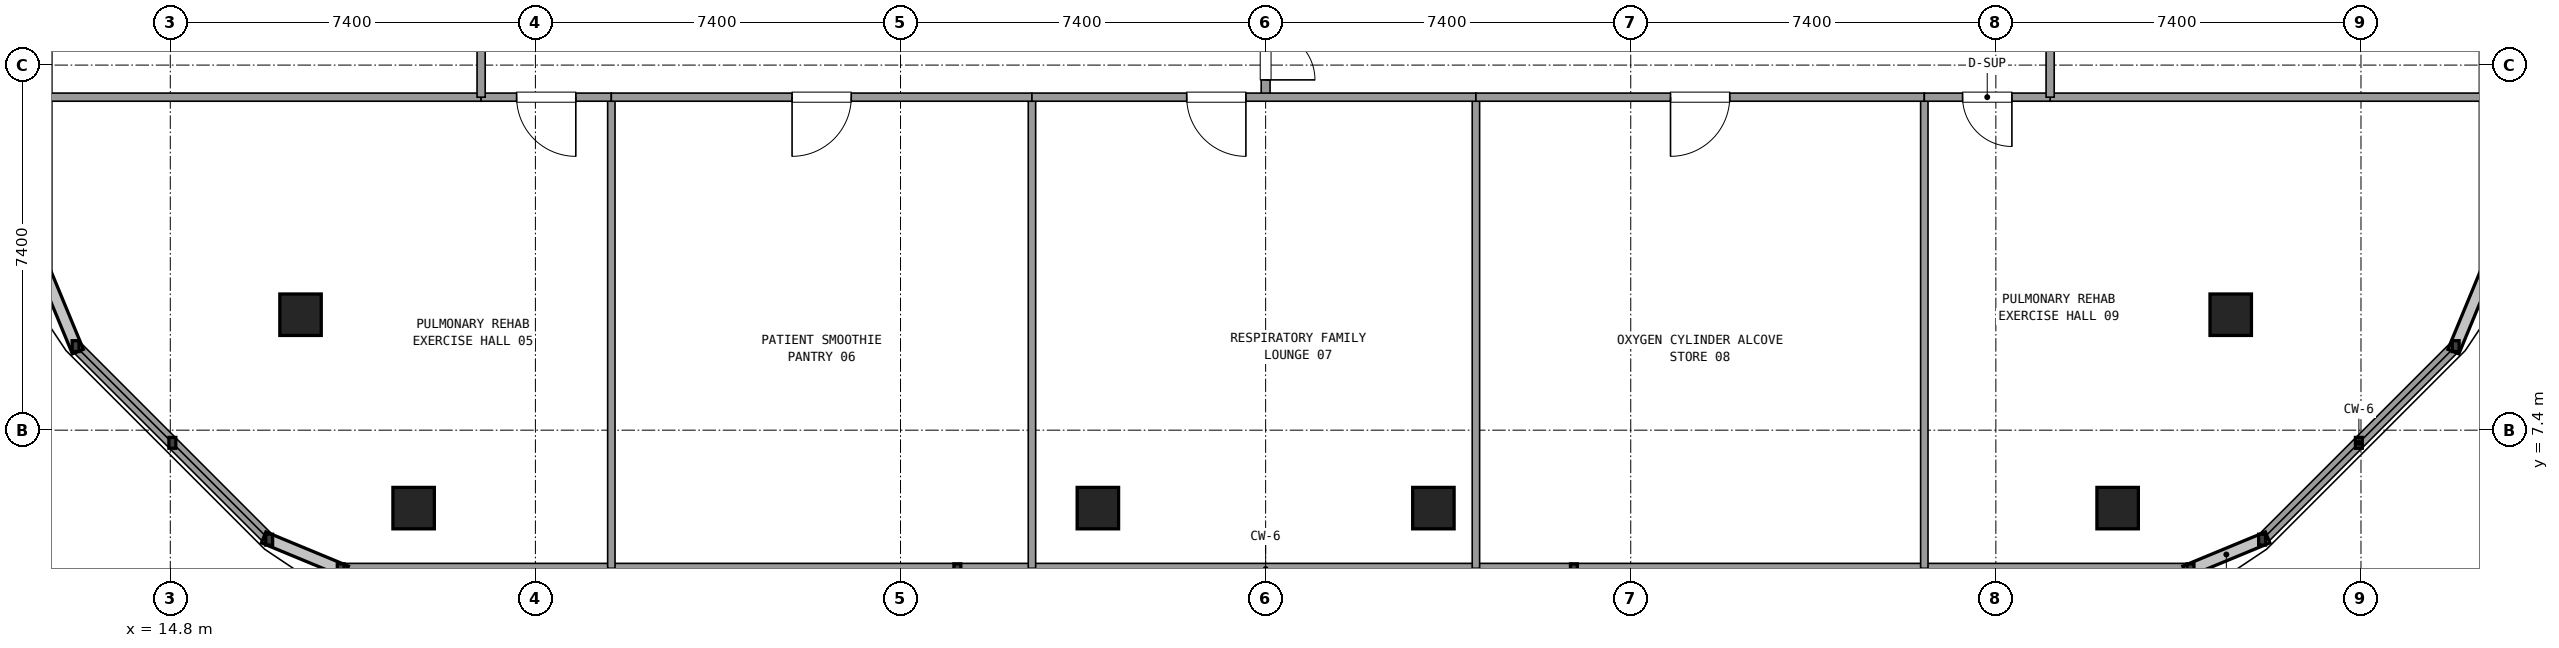
"""IFC4 building model, lengths in metres.
Left out: names, types, materials, properties, quantities, classifications, styles, units other than length and angle.
Written with IfcOpenShell. Run it as: python <this file> out.ifc"""

import sys

from ifc_helpers import new_model, si_unit, direction, frame, frame_2d, origin, origin_2d, place, context, subcontext, project, spatial, rectangle, extrude, element, fill, save


model = new_model("IFC4")
c1 = context("Model", 3, precision=1e-05, world=origin(), true_north=direction((0.0, 1.0)))
c2 = subcontext(c1, "Body", "Model", "MODEL_VIEW")
j1 = project(units=[si_unit("LENGTHUNIT", "METRE"), si_unit("PLANEANGLEUNIT", "RADIAN")], contexts=[c1])
p1 = place(None, origin())
s1 = spatial("IfcSite", under=j1, at=p1, CompositionType="ELEMENT")
p2 = place(p1, origin())
s2 = spatial("IfcBuilding", under=s1, at=p2, CompositionType="ELEMENT")
p3 = place(p2, frame((0.0, 0.0, 271.62)))
s3 = spatial("IfcBuildingStorey", under=s2, at=p3, CompositionType="ELEMENT", Elevation=271.62)
for number, where, z_axis, x_axis in (
    (1, (17.44, 9.74, 0.0), (0.0, 0.0, 1.0), (1.0, 0.0, 0.0)),
    (2, (19.732, 5.82, 0.0), (0.0, 0.0, 1.0), (1.0, 0.0, 0.0)),
    (3, (33.6, 5.82, 0.0), (0.0, 0.0, 1.0), (1.0, 0.0, 0.0)),
    (4, (40.4, 5.82, 0.0), (0.0, 0.0, 1.0), (1.0, 0.0, 0.0)),
    (5, (54.268, 5.82, 0.0), (0.0, 0.0, 1.0), (1.0, 0.0, 0.0)),
    (6, (56.56, 9.74, 0.0), (0.0, 0.0, 1.0), (1.0, 0.0, 0.0)),
):
    element("IfcColumn", number, at=place(p3, frame(where, z_axis=z_axis, x_axis=x_axis)), inside=s3, PredefinedType="COLUMN", context=c2, shape_type="SweptSolid", body=[
        extrude(rectangle(XDim=0.84, YDim=0.84, at=origin_2d()), origin(), (0.0, 0.0, 1.0), 3.6),
    ])
p4 = place(p3, frame((18.255, 4.58, 0.0), z_axis=(0.0, 0.0, 1.0), x_axis=(1.0, 0.0, 0.0)))
e7 = element("IfcWall", 7, at=p4, inside=s3, PredefinedType="SOLIDWALL", context=c2, shape_type="SweptSolid", body=[
    extrude(rectangle(XDim=37.49, YDim=0.24, at=frame_2d((18.745, 0.0))), origin(), (0.0, 0.0, 1.0), 0.85),
])
p5 = place(p3, frame((57.196, 5.181, 0.0), z_axis=(0.0, 0.0, 1.0), x_axis=(0.707084777957, 0.707128783731, 0.0)))
e8 = element("IfcWall", 8, at=p5, inside=s3, PredefinedType="SOLIDWALL", context=c2, shape_type="SweptSolid", body=[
    extrude(rectangle(XDim=5.548, YDim=0.24, at=frame_2d((2.774, 0.0))), origin(), (0.0, 0.0, 1.0), 0.85),
])
for number, where, z_axis, x_axis in (
    (9, (61.72, 10.555, 0.0), (0.0, 0.0, 1.0), (0.0, 1.0, 0.0)),
    (10, (12.28, 24.36, 0.0), (0.0, 0.0, 1.0), (0.0, -1.0, 0.0)),
):
    element("IfcWall", number, at=place(p3, frame(where, z_axis=z_axis, x_axis=x_axis)), inside=s3, PredefinedType="SOLIDWALL", context=c2, shape_type="SweptSolid", body=[
        extrude(rectangle(XDim=13.805, YDim=0.24, at=frame_2d((6.903, 0.0))), origin(), (0.0, 0.0, 1.0), 0.85),
    ])
p6 = place(p3, frame((12.881, 9.104, 0.0), z_axis=(0.0, 0.0, 1.0), x_axis=(0.707084777957, -0.707128783731, 0.0)))
e11 = element("IfcWall", 11, at=p6, inside=s3, PredefinedType="SOLIDWALL", context=c2, shape_type="SweptSolid", body=[
    extrude(rectangle(XDim=5.548, YDim=0.24, at=frame_2d((2.774, 0.0))), origin(), (0.0, 0.0, 1.0), 0.85),
])
p7 = place(p3, frame((37.0, 14.15, 0.0), z_axis=(0.0, 0.0, 1.0), x_axis=(0.0, 1.0, 0.0)))
e12 = element("IfcWall", 12, at=p7, inside=s3, PredefinedType="PARTITIONING", context=c2, shape_type="SweptSolid", body=[
    extrude(rectangle(XDim=2.7, YDim=0.18, at=frame_2d((1.35, 0.0))), origin(), (0.0, 0.0, 1.0), 2.61),
])
p8 = place(p7, frame((0.35, 0.0, 0.0)))
e13 = element("IfcOpeningElement", 13, at=p8, cuts=e12, PredefinedType="OPENING", context=c2, shape_type="SweptSolid", body=[
    extrude(rectangle(XDim=2.0, YDim=2.2, at=frame_2d((1.0, 1.1))), frame((0.0, 0.1, 0.0), z_axis=(0.0, -1.0, 0.0), x_axis=(1.0, 0.0, 0.0)), (0.0, 0.0, 1.0), 0.2),
])
for number, where, z_axis, x_axis in (
    (14, (12.3, 14.15, 0.0), (0.0, 0.0, 1.0), (1.0, 0.0, 0.0)),
    (15, (52.9, 14.15, 0.0), (0.0, 0.0, 1.0), (1.0, 0.0, 0.0)),
):
    element("IfcWall", number, at=place(p3, frame(where, z_axis=z_axis, x_axis=x_axis)), inside=s3, PredefinedType="PARTITIONING", context=c2, shape_type="SweptSolid", body=[
        extrude(rectangle(XDim=8.8, YDim=0.165, at=frame_2d((4.4, 0.0))), origin(), (0.0, 0.0, 1.0), 2.61),
    ])
p9 = place(p3, frame((23.739, 14.15, 0.0), z_axis=(0.0, 0.0, 1.0), x_axis=(0.0, -1.0, 0.0)))
e16 = element("IfcWall", 16, at=p9, inside=s3, PredefinedType="PARTITIONING", context=c2, shape_type="SweptSolid", body=[
    extrude(rectangle(XDim=9.55, YDim=0.15, at=frame_2d((4.775, 0.0))), origin(), (0.0, 0.0, 1.0), 2.61),
])
p10 = place(p3, frame((21.1, 14.15, 0.0), z_axis=(0.0, 0.0, 1.0), x_axis=(1.0, 0.0, 0.0)))
e17 = element("IfcWall", 17, at=p10, inside=s3, PredefinedType="PARTITIONING", context=c2, shape_type="SweptSolid", body=[
    extrude(rectangle(XDim=2.639, YDim=0.165, at=frame_2d((1.319, 0.0))), origin(), (0.0, 0.0, 1.0), 2.61),
])
p11 = place(p10, frame((0.719, 0.0, 0.0)))
e18 = element("IfcOpeningElement", 18, at=p11, cuts=e17, PredefinedType="OPENING", context=c2, shape_type="SweptSolid", body=[
    extrude(rectangle(XDim=1.2, YDim=2.15, at=frame_2d((0.6, 1.075))), frame((0.0, 0.093, 0.0), z_axis=(0.0, -1.0, 0.0), x_axis=(1.0, 0.0, 0.0)), (0.0, 0.0, 1.0), 0.185),
])
p12 = place(p3, frame((32.264, 14.15, 0.0), z_axis=(0.0, 0.0, 1.0), x_axis=(0.0, -1.0, 0.0)))
e19 = element("IfcWall", 19, at=p12, inside=s3, PredefinedType="PARTITIONING", context=c2, shape_type="SweptSolid", body=[
    extrude(rectangle(XDim=9.55, YDim=0.15, at=frame_2d((4.775, 0.0))), origin(), (0.0, 0.0, 1.0), 2.61),
])
p13 = place(p3, frame((23.739, 14.15, 0.0), z_axis=(0.0, 0.0, 1.0), x_axis=(1.0, 0.0, 0.0)))
e20 = element("IfcWall", 20, at=p13, inside=s3, PredefinedType="PARTITIONING", context=c2, shape_type="SweptSolid", body=[
    extrude(rectangle(XDim=8.525, YDim=0.165, at=frame_2d((4.262, 0.0))), origin(), (0.0, 0.0, 1.0), 2.61),
])
p14 = place(p13, frame((3.663, 0.0, 0.0)))
e21 = element("IfcOpeningElement", 21, at=p14, cuts=e20, PredefinedType="OPENING", context=c2, shape_type="SweptSolid", body=[
    extrude(rectangle(XDim=1.2, YDim=2.15, at=frame_2d((0.6, 1.075))), frame((0.0, 0.093, 0.0), z_axis=(0.0, -1.0, 0.0), x_axis=(1.0, 0.0, 0.0)), (0.0, 0.0, 1.0), 0.185),
])
p15 = place(p3, frame((41.262, 14.15, 0.0), z_axis=(0.0, 0.0, 1.0), x_axis=(0.0, -1.0, 0.0)))
e22 = element("IfcWall", 22, at=p15, inside=s3, PredefinedType="PARTITIONING", context=c2, shape_type="SweptSolid", body=[
    extrude(rectangle(XDim=9.55, YDim=0.15, at=frame_2d((4.775, 0.0))), origin(), (0.0, 0.0, 1.0), 2.61),
])
p16 = place(p3, frame((32.264, 14.15, 0.0), z_axis=(0.0, 0.0, 1.0), x_axis=(1.0, 0.0, 0.0)))
e23 = element("IfcWall", 23, at=p16, inside=s3, PredefinedType="PARTITIONING", context=c2, shape_type="SweptSolid", body=[
    extrude(rectangle(XDim=8.998, YDim=0.165, at=frame_2d((4.499, 0.0))), origin(), (0.0, 0.0, 1.0), 2.61),
])
p17 = place(p16, frame((3.136, 0.0, 0.0)))
e24 = element("IfcOpeningElement", 24, at=p17, cuts=e23, PredefinedType="OPENING", context=c2, shape_type="SweptSolid", body=[
    extrude(rectangle(XDim=1.2, YDim=2.15, at=frame_2d((0.6, 1.075))), frame((0.0, 0.093, 0.0), z_axis=(0.0, -1.0, 0.0), x_axis=(1.0, 0.0, 0.0)), (0.0, 0.0, 1.0), 0.185),
])
p18 = place(p3, frame((50.35, 14.15, 0.0), z_axis=(0.0, 0.0, 1.0), x_axis=(0.0, -1.0, 0.0)))
e25 = element("IfcWall", 25, at=p18, inside=s3, PredefinedType="PARTITIONING", context=c2, shape_type="SweptSolid", body=[
    extrude(rectangle(XDim=9.55, YDim=0.15, at=frame_2d((4.775, 0.0))), origin(), (0.0, 0.0, 1.0), 2.61),
])
p19 = place(p3, frame((41.262, 14.15, 0.0), z_axis=(0.0, 0.0, 1.0), x_axis=(1.0, 0.0, 0.0)))
e26 = element("IfcWall", 26, at=p19, inside=s3, PredefinedType="PARTITIONING", context=c2, shape_type="SweptSolid", body=[
    extrude(rectangle(XDim=9.088, YDim=0.165, at=frame_2d((4.544, 0.0))), origin(), (0.0, 0.0, 1.0), 2.61),
])
p20 = place(p19, frame((3.944, 0.0, 0.0)))
e27 = element("IfcOpeningElement", 27, at=p20, cuts=e26, PredefinedType="OPENING", context=c2, shape_type="SweptSolid", body=[
    extrude(rectangle(XDim=1.2, YDim=2.15, at=frame_2d((0.6, 1.075))), frame((0.0, 0.093, 0.0), z_axis=(0.0, -1.0, 0.0), x_axis=(1.0, 0.0, 0.0)), (0.0, 0.0, 1.0), 0.185),
])
p21 = place(p3, frame((50.35, 14.15, 0.0), z_axis=(0.0, 0.0, 1.0), x_axis=(1.0, 0.0, 0.0)))
e28 = element("IfcWall", 28, at=p21, inside=s3, PredefinedType="PARTITIONING", context=c2, shape_type="SweptSolid", body=[
    extrude(rectangle(XDim=2.55, YDim=0.165, at=frame_2d((1.275, 0.0))), origin(), (0.0, 0.0, 1.0), 2.61),
])
p22 = place(p21, frame((0.775, 0.0, 0.0)))
e29 = element("IfcOpeningElement", 29, at=p22, cuts=e28, PredefinedType="OPENING", context=c2, shape_type="SweptSolid", body=[
    extrude(rectangle(XDim=1.0, YDim=2.15, at=frame_2d((0.5, 1.075))), frame((0.0, 0.093, 0.0), z_axis=(0.0, -1.0, 0.0), x_axis=(1.0, 0.0, 0.0)), (0.0, 0.0, 1.0), 0.185),
])
p23 = place(p3, frame((21.1, 14.15, 0.0), z_axis=(0.0, 0.0, 1.0), x_axis=(0.0, 1.0, 0.0)))
e30 = element("IfcWall", 30, at=p23, inside=s3, PredefinedType="PARTITIONING", context=c2, shape_type="SweptSolid", body=[
    extrude(rectangle(XDim=8.93, YDim=0.165, at=frame_2d((4.465, 0.0))), origin(), (0.0, 0.0, 1.0), 2.61),
])
p24 = place(p23, frame((3.865, 0.0, 0.0)))
e31 = element("IfcOpeningElement", 31, at=p24, cuts=e30, PredefinedType="OPENING", context=c2, shape_type="SweptSolid", body=[
    extrude(rectangle(XDim=1.2, YDim=2.15, at=frame_2d((0.6, 1.075))), frame((0.0, 0.093, 0.0), z_axis=(0.0, -1.0, 0.0), x_axis=(1.0, 0.0, 0.0)), (0.0, 0.0, 1.0), 0.185),
])
p25 = place(p3, frame((52.9, 14.15, 0.0), z_axis=(0.0, 0.0, 1.0), x_axis=(0.0, 1.0, 0.0)))
e32 = element("IfcWall", 32, at=p25, inside=s3, PredefinedType="PARTITIONING", context=c2, shape_type="SweptSolid", body=[
    extrude(rectangle(XDim=9.95, YDim=0.165, at=frame_2d((4.975, 0.0))), origin(), (0.0, 0.0, 1.0), 2.61),
])
p26 = place(p25, frame((4.375, 0.0, 0.0)))
e33 = element("IfcOpeningElement", 33, at=p26, cuts=e32, PredefinedType="OPENING", context=c2, shape_type="SweptSolid", body=[
    extrude(rectangle(XDim=1.2, YDim=2.15, at=frame_2d((0.6, 1.075))), frame((0.0, 0.093, 0.0), z_axis=(0.0, -1.0, 0.0), x_axis=(1.0, 0.0, 0.0)), (0.0, 0.0, 1.0), 0.185),
])
p27 = place(p8, frame((2.0, 0.0, 0.0), z_axis=(0.0, 0.0, 1.0), x_axis=(-1.0, 0.0, 0.0)))
e34 = element("IfcDoor", 34, at=p27, inside=s3, OperationType="DOUBLE_DOOR_SINGLE_SWING", PredefinedType="DOOR", context=c2, shape_type="SweptSolid", body=[
    extrude(rectangle(XDim=2.0, YDim=2.2, at=frame_2d((1.0, 1.1))), frame((0.0, 0.025, 0.0), z_axis=(0.0, -1.0, 0.0), x_axis=(1.0, 0.0, 0.0)), (0.0, 0.0, 1.0), 0.05),
])
fill(e13, e34)
p28 = place(p11, frame((1.2, 0.0, 0.0), z_axis=(0.0, 0.0, 1.0), x_axis=(-1.0, 0.0, 0.0)))
e35 = element("IfcDoor", 35, at=p28, inside=s3, OperationType="SINGLE_SWING_RIGHT", PredefinedType="DOOR", context=c2, shape_type="SweptSolid", body=[
    extrude(rectangle(XDim=1.2, YDim=2.15, at=frame_2d((0.6, 1.075))), frame((0.0, 0.025, 0.0), z_axis=(0.0, -1.0, 0.0), x_axis=(1.0, 0.0, 0.0)), (0.0, 0.0, 1.0), 0.05),
])
fill(e18, e35)
p29 = place(p14, frame((1.2, 0.0, 0.0), z_axis=(0.0, 0.0, 1.0), x_axis=(-1.0, 0.0, 0.0)))
e36 = element("IfcDoor", 36, at=p29, inside=s3, OperationType="SINGLE_SWING_LEFT", PredefinedType="DOOR", context=c2, shape_type="SweptSolid", body=[
    extrude(rectangle(XDim=1.2, YDim=2.15, at=frame_2d((0.6, 1.075))), frame((0.0, 0.025, 0.0), z_axis=(0.0, -1.0, 0.0), x_axis=(1.0, 0.0, 0.0)), (0.0, 0.0, 1.0), 0.05),
])
fill(e21, e36)
p30 = place(p17, frame((1.2, 0.0, 0.0), z_axis=(0.0, 0.0, 1.0), x_axis=(-1.0, 0.0, 0.0)))
e37 = element("IfcDoor", 37, at=p30, inside=s3, OperationType="SINGLE_SWING_RIGHT", PredefinedType="DOOR", context=c2, shape_type="SweptSolid", body=[
    extrude(rectangle(XDim=1.2, YDim=2.15, at=frame_2d((0.6, 1.075))), frame((0.0, 0.025, 0.0), z_axis=(0.0, -1.0, 0.0), x_axis=(1.0, 0.0, 0.0)), (0.0, 0.0, 1.0), 0.05),
])
fill(e24, e37)
p31 = place(p20, frame((1.2, 0.0, 0.0), z_axis=(0.0, 0.0, 1.0), x_axis=(-1.0, 0.0, 0.0)))
e38 = element("IfcDoor", 38, at=p31, inside=s3, OperationType="SINGLE_SWING_LEFT", PredefinedType="DOOR", context=c2, shape_type="SweptSolid", body=[
    extrude(rectangle(XDim=1.2, YDim=2.15, at=frame_2d((0.6, 1.075))), frame((0.0, 0.025, 0.0), z_axis=(0.0, -1.0, 0.0), x_axis=(1.0, 0.0, 0.0)), (0.0, 0.0, 1.0), 0.05),
])
fill(e27, e38)
p32 = place(p22, frame((1.0, 0.0, 0.0), z_axis=(0.0, 0.0, 1.0), x_axis=(-1.0, 0.0, 0.0)))
e39 = element("IfcDoor", 39, at=p32, inside=s3, OperationType="SINGLE_SWING_RIGHT", PredefinedType="DOOR", context=c2, shape_type="SweptSolid", body=[
    extrude(rectangle(XDim=1.0, YDim=2.15, at=frame_2d((0.5, 1.075))), frame((0.0, 0.025, 0.0), z_axis=(0.0, -1.0, 0.0), x_axis=(1.0, 0.0, 0.0)), (0.0, 0.0, 1.0), 0.05),
])
fill(e29, e39)
save(model, sys.argv[1])
